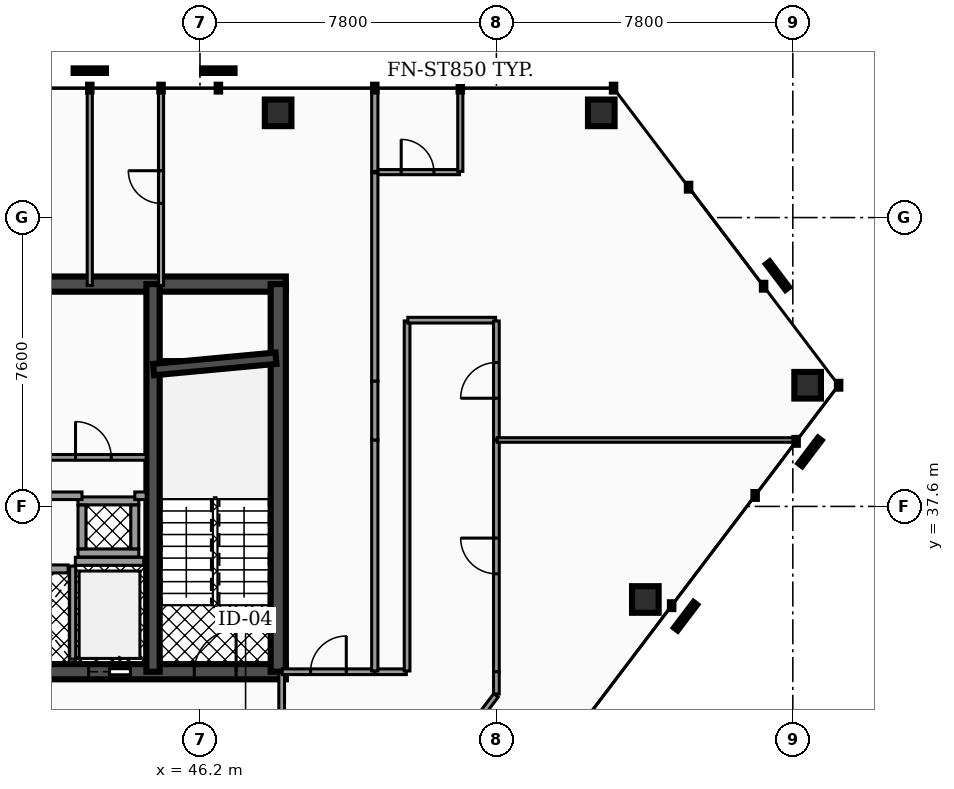
"""IFC4 building model, lengths in metres.
Left out: names, types, materials, properties, quantities, classifications, styles, units other than length and angle.
Written with IfcOpenShell. Run it as: python <this file> out.ifc"""

import sys

from ifc_helpers import new_model, si_unit, direction, frame, frame_2d, origin, origin_2d, place, context, subcontext, project, spatial, rectangle, hollow_rectangle, extrude, element, fill, save


model = new_model("IFC4")
c1 = context("Model", 3, precision=1e-05, world=origin(), true_north=direction((0.0, 1.0)))
c2 = subcontext(c1, "Body", "Model", "MODEL_VIEW")
j1 = project(units=[si_unit("LENGTHUNIT", "METRE"), si_unit("PLANEANGLEUNIT", "RADIAN")], contexts=[c1])
p1 = place(None, origin())
s1 = spatial("IfcSite", under=j1, at=p1, CompositionType="ELEMENT")
p2 = place(p1, origin())
s2 = spatial("IfcBuilding", under=s1, at=p2, CompositionType="ELEMENT")
p3 = place(p2, frame((0.0, 0.0, 187.0)))
s3 = spatial("IfcBuildingStorey", under=s2, at=p3, CompositionType="ELEMENT", Elevation=187.0)
p4 = place(p3, frame((28.4, 43.45, 0.0), z_axis=(0.0, 0.0, 1.0), x_axis=(1.0, 0.0, 0.0)))
e1 = element("IfcWall", 1, at=p4, inside=s3, PredefinedType="SHEAR", context=c2, shape_type="SweptSolid", body=[
    extrude(rectangle(XDim=20.06, YDim=0.4, at=frame_2d((10.03, 0.0))), origin(), (0.0, 0.0, 1.0), 3.5),
])
p5 = place(p3, frame((28.4, 33.25, 0.0), z_axis=(0.0, 0.0, 1.0), x_axis=(1.0, 0.0, 0.0)))
e2 = element("IfcWall", 2, at=p5, inside=s3, PredefinedType="SHEAR", context=c2, shape_type="SweptSolid", body=[
    extrude(rectangle(XDim=20.06, YDim=0.4, at=frame_2d((10.03, 0.0))), origin(), (0.0, 0.0, 1.0), 3.5),
])
p6 = place(p5, frame((4.03, 0.0, 0.0)))
e3 = element("IfcOpeningElement", 3, at=p6, cuts=e2, PredefinedType="OPENING", context=c2, shape_type="SweptSolid", body=[
    extrude(rectangle(XDim=1.1, YDim=2.15, at=frame_2d((0.55, 1.075))), frame((0.0, 0.21, 0.0), z_axis=(0.0, -1.0, 0.0), x_axis=(1.0, 0.0, 0.0)), (0.0, 0.0, 1.0), 0.42),
])
p7 = place(p5, frame((14.87, 0.0, 0.0)))
e4 = element("IfcOpeningElement", 4, at=p7, cuts=e2, PredefinedType="OPENING", context=c2, shape_type="SweptSolid", body=[
    extrude(rectangle(XDim=1.1, YDim=2.15, at=frame_2d((0.55, 1.075))), frame((0.0, 0.21, 0.0), z_axis=(0.0, -1.0, 0.0), x_axis=(1.0, 0.0, 0.0)), (0.0, 0.0, 1.0), 0.42),
])
p8 = place(p5, frame((5.95, 0.0, 0.0)))
e5 = element("IfcOpeningElement", 5, at=p8, cuts=e2, PredefinedType="OPENING", context=c2, shape_type="SweptSolid", body=[
    extrude(rectangle(XDim=1.0, YDim=2.1, at=frame_2d((0.5, 1.05))), frame((0.0, 0.21, 0.0), z_axis=(0.0, -1.0, 0.0), x_axis=(1.0, 0.0, 0.0)), (0.0, 0.0, 1.0), 0.42),
])
p9 = place(p5, frame((7.65, 0.0, 0.0)))
e6 = element("IfcOpeningElement", 6, at=p9, cuts=e2, PredefinedType="OPENING", context=c2, shape_type="SweptSolid", body=[
    extrude(rectangle(XDim=1.0, YDim=2.1, at=frame_2d((0.5, 1.05))), frame((0.0, 0.21, 0.0), z_axis=(0.0, -1.0, 0.0), x_axis=(1.0, 0.0, 0.0)), (0.0, 0.0, 1.0), 0.42),
])
p10 = place(p5, frame((1.31, 0.0, 0.0)))
e7 = element("IfcOpeningElement", 7, at=p10, cuts=e2, PredefinedType="OPENING", context=c2, shape_type="SweptSolid", body=[
    extrude(rectangle(XDim=1.1, YDim=2.2, at=frame_2d((0.55, 1.1))), frame((0.0, 0.21, 0.0), z_axis=(0.0, -1.0, 0.0), x_axis=(1.0, 0.0, 0.0)), (0.0, 0.0, 1.0), 0.42),
])
p11 = place(p5, frame((9.44, 0.0, 0.0)))
e8 = element("IfcOpeningElement", 8, at=p11, cuts=e2, PredefinedType="OPENING", context=c2, shape_type="SweptSolid", body=[
    extrude(rectangle(XDim=1.12, YDim=2.05, at=frame_2d((0.56, 1.025))), frame((0.0, 0.21, 0.0), z_axis=(0.0, -1.0, 0.0), x_axis=(1.0, 0.0, 0.0)), (0.0, 0.0, 1.0), 0.42),
])
p12 = place(p5, frame((17.65, 0.0, 0.0)))
e9 = element("IfcOpeningElement", 9, at=p12, cuts=e2, PredefinedType="OPENING", context=c2, shape_type="SweptSolid", body=[
    extrude(rectangle(XDim=1.1, YDim=2.2, at=frame_2d((0.55, 1.1))), frame((0.0, 0.21, 0.0), z_axis=(0.0, -1.0, 0.0), x_axis=(1.0, 0.0, 0.0)), (0.0, 0.0, 1.0), 0.42),
])
p13 = place(p3, frame((44.965, 33.25, 0.0), z_axis=(0.0, 0.0, 1.0), x_axis=(0.0, 1.0, 0.0)))
e10 = element("IfcWall", 10, at=p13, inside=s3, PredefinedType="SHEAR", context=c2, shape_type="SweptSolid", body=[
    extrude(rectangle(XDim=10.2, YDim=0.35, at=frame_2d((5.1, 0.0))), origin(), (0.0, 0.0, 1.0), 3.5),
])
p14 = place(p3, frame((48.26, 33.25, 0.0), z_axis=(0.0, 0.0, 1.0), x_axis=(0.0, 1.0, 0.0)))
e11 = element("IfcWall", 11, at=p14, inside=s3, PredefinedType="SHEAR", context=c2, shape_type="SweptSolid", body=[
    extrude(rectangle(XDim=10.2, YDim=0.4, at=frame_2d((5.1, 0.0))), origin(), (0.0, 0.0, 1.0), 3.5),
])
p15 = place(p3, frame((44.98, 41.2, 0.0), z_axis=(0.0, 0.0, 1.0), x_axis=(0.995686468965, 0.09278176286, 0.0)))
e12 = element("IfcWall", 12, at=p15, inside=s3, PredefinedType="SHEAR", context=c2, shape_type="SweptSolid", body=[
    extrude(rectangle(XDim=3.234, YDim=0.3, at=frame_2d((1.617, 0.0))), origin(), (0.0, 0.0, 1.0), 3.5),
])
for number, where, z_axis, x_axis in (
    (13, (56.76, 47.956, 0.0), (0.0, 0.0, 1.0), (1.0, 0.0, 0.0)),
    (14, (48.256, 47.956, 0.0), (0.0, 0.0, 1.0), (1.0, 0.0, 0.0)),
    (15, (57.919, 35.151, 0.0), (0.0, 0.0, 1.0), (1.0, 0.0, 0.0)),
    (16, (62.19, 40.788, 0.0), (0.0, 0.0, 1.0), (1.0, 0.0, 0.0)),
):
    element("IfcColumn", number, at=place(p3, frame(where, z_axis=z_axis, x_axis=x_axis)), inside=s3, PredefinedType="COLUMN", context=c2, shape_type="SweptSolid", body=[
        extrude(hollow_rectangle(XDim=0.7, YDim=0.7, WallThickness=0.035, at=origin_2d()), origin(), (0.0, 0.0, 1.0), 3.5),
    ])
p16 = place(p3, frame((42.92, 36.155, 0.0), z_axis=(0.0, 0.0, 1.0), x_axis=(1.0, 0.0, 0.0)))
e17 = element("IfcWall", 17, at=p16, inside=s3, PredefinedType="SOLIDWALL", context=c2, shape_type="SweptSolid", body=[
    extrude(rectangle(XDim=1.8, YDim=0.21, at=frame_2d((0.9, 0.0))), origin(), (0.0, 0.0, 1.0), 2.472),
])
p17 = place(p3, frame((42.85, 33.58, 0.0), z_axis=(0.0, 0.0, 1.0), x_axis=(0.0, 1.0, 0.0)))
e18 = element("IfcWall", 18, at=p17, inside=s3, PredefinedType="SOLIDWALL", context=c2, shape_type="SweptSolid", body=[
    extrude(rectangle(XDim=2.45, YDim=0.16, at=frame_2d((1.225, 0.0))), origin(), (0.0, 0.0, 1.0), 2.472),
])
p18 = place(p3, frame((41.17, 35.955, 0.0), z_axis=(0.0, 0.0, 1.0), x_axis=(1.0, 0.0, 0.0)))
e19 = element("IfcWall", 19, at=p18, inside=s3, PredefinedType="SOLIDWALL", context=c2, shape_type="SweptSolid", body=[
    extrude(rectangle(XDim=1.56, YDim=0.21, at=frame_2d((0.78, 0.0))), origin(), (0.0, 0.0, 1.0), 2.472),
])
for number, where, z_axis, x_axis in (
    (20, (42.99, 36.375, 0.0), (0.0, 0.0, 1.0), (1.0, 0.0, 0.0)),
    (21, (42.99, 37.745, 0.0), (0.0, 0.0, 1.0), (1.0, 0.0, 0.0)),
):
    element("IfcWall", number, at=place(p3, frame(where, z_axis=z_axis, x_axis=x_axis)), inside=s3, PredefinedType="SOLIDWALL", context=c2, shape_type="SweptSolid", body=[
        extrude(rectangle(XDim=1.6, YDim=0.21, at=frame_2d((0.8, 0.0))), origin(), (0.0, 0.0, 1.0), 3.5),
    ])
for number, where, z_axis, x_axis in (
    (22, (43.095, 36.485, 0.0), (0.0, 0.0, 1.0), (0.0, 1.0, 0.0)),
    (23, (44.485, 36.485, 0.0), (0.0, 0.0, 1.0), (0.0, 1.0, 0.0)),
):
    element("IfcWall", number, at=place(p3, frame(where, z_axis=z_axis, x_axis=x_axis)), inside=s3, PredefinedType="SOLIDWALL", context=c2, shape_type="SweptSolid", body=[
        extrude(rectangle(XDim=1.15, YDim=0.21, at=frame_2d((0.575, 0.0))), origin(), (0.0, 0.0, 1.0), 3.5),
    ])
p19 = place(p3, frame((42.005, 38.89, 0.0), z_axis=(0.0, 0.0, 1.0), x_axis=(1.0, 0.0, 0.0)))
e24 = element("IfcWall", 24, at=p19, inside=s3, PredefinedType="PARTITIONING", context=c2, shape_type="SweptSolid", body=[
    extrude(rectangle(XDim=2.78, YDim=0.15, at=frame_2d((1.39, 0.0))), origin(), (0.0, 0.0, 1.0), 2.457),
])
p20 = place(p19, frame((0.92, 0.0, 0.0)))
e25 = element("IfcOpeningElement", 25, at=p20, cuts=e24, PredefinedType="OPENING", context=c2, shape_type="SweptSolid", body=[
    extrude(rectangle(XDim=0.94, YDim=2.05, at=frame_2d((0.47, 1.025))), frame((0.0, 0.085, 0.0), z_axis=(0.0, -1.0, 0.0), x_axis=(1.0, 0.0, 0.0)), (0.0, 0.0, 1.0), 0.17),
])
p21 = place(p3, frame((39.27, 37.88, 0.0), z_axis=(0.0, 0.0, 1.0), x_axis=(1.0, 0.0, 0.0)))
e26 = element("IfcWall", 26, at=p21, inside=s3, PredefinedType="PARTITIONING", context=c2, shape_type="SweptSolid", body=[
    extrude(rectangle(XDim=3.825, YDim=0.2, at=frame_2d((1.913, 0.0))), origin(), (0.0, 0.0, 1.0), 2.457),
])
p22 = place(p3, frame((44.485, 37.88, 0.0), z_axis=(0.0, 0.0, 1.0), x_axis=(1.0, 0.0, 0.0)))
e27 = element("IfcWall", 27, at=p22, inside=s3, PredefinedType="PARTITIONING", context=c2, shape_type="SweptSolid", body=[
    extrude(rectangle(XDim=0.3, YDim=0.2, at=frame_2d((0.15, 0.0))), origin(), (0.0, 0.0, 1.0), 2.457),
])
p23 = place(p3, frame((48.35, 30.17, 0.0), z_axis=(0.0, 0.0, 1.0), x_axis=(0.0, 1.0, 0.0)))
e28 = element("IfcWall", 28, at=p23, inside=s3, PredefinedType="PARTITIONING", context=c2, shape_type="SweptSolid", body=[
    extrude(rectangle(XDim=3.06, YDim=0.15, at=frame_2d((1.53, 0.0))), origin(), (0.0, 0.0, 1.0), 2.457),
])
p24 = place(p23, frame((1.06, 0.0, 0.0)))
e29 = element("IfcOpeningElement", 29, at=p24, cuts=e28, PredefinedType="OPENING", context=c2, shape_type="SweptSolid", body=[
    extrude(rectangle(XDim=0.94, YDim=2.05, at=frame_2d((0.47, 1.025))), frame((0.0, 0.085, 0.0), z_axis=(0.0, -1.0, 0.0), x_axis=(1.0, 0.0, 0.0)), (0.0, 0.0, 1.0), 0.17),
])
p25 = place(p3, frame((54.0, 33.25, 0.0), z_axis=(0.0, 0.0, 1.0), x_axis=(0.0, 1.0, 0.0)))
e30 = element("IfcWall", 30, at=p25, inside=s3, PredefinedType="PARTITIONING", context=c2, shape_type="SweptSolid", body=[
    extrude(rectangle(XDim=6.093, YDim=0.15, at=frame_2d((3.046, 0.0))), origin(), (0.0, 0.0, 1.0), 2.457),
])
p26 = place(p25, frame((2.576, 0.0, 0.0)))
e31 = element("IfcOpeningElement", 31, at=p26, cuts=e30, PredefinedType="OPENING", context=c2, shape_type="SweptSolid", body=[
    extrude(rectangle(XDim=0.94, YDim=2.05, at=frame_2d((0.47, 1.025))), frame((0.0, 0.085, 0.0), z_axis=(0.0, -1.0, 0.0), x_axis=(1.0, 0.0, 0.0)), (0.0, 0.0, 1.0), 0.17),
])
p27 = place(p3, frame((54.0, 32.664, 0.0), z_axis=(0.0, 0.0, 1.0), x_axis=(0.0, 1.0, 0.0)))
e32 = element("IfcWall", 32, at=p27, inside=s3, PredefinedType="PARTITIONING", context=c2, shape_type="SweptSolid", body=[
    extrude(rectangle(XDim=0.586, YDim=0.15, at=frame_2d((0.293, 0.0))), origin(), (0.0, 0.0, 1.0), 2.457),
])
p28 = place(p3, frame((52.114, 30.154, 0.0), z_axis=(0.0, 0.0, 1.0), x_axis=(0.603819819336, 0.797120835116, 0.0)))
e33 = element("IfcWall", 33, at=p28, inside=s3, PredefinedType="PARTITIONING", context=c2, shape_type="SweptSolid", body=[
    extrude(rectangle(XDim=3.103, YDim=0.15, at=frame_2d((1.552, 0.0))), origin(), (0.0, 0.0, 1.0), 2.457),
])
p29 = place(p3, frame((50.805, 33.25, 0.0), z_axis=(0.0, 0.0, 1.0), x_axis=(1.0, 0.0, 0.0)))
e34 = element("IfcWall", 34, at=p29, inside=s3, PredefinedType="PARTITIONING", context=c2, shape_type="SweptSolid", body=[
    extrude(rectangle(XDim=0.825, YDim=0.15, at=frame_2d((0.413, 0.0))), origin(), (0.0, 0.0, 1.0), 2.457),
])
p30 = place(p3, frame((51.65, 33.27, 0.0), z_axis=(0.0, 0.0, 1.0), x_axis=(0.0, 1.0, 0.0)))
e35 = element("IfcWall", 35, at=p30, inside=s3, PredefinedType="PARTITIONING", context=c2, shape_type="SweptSolid", body=[
    extrude(rectangle(XDim=9.21, YDim=0.15, at=frame_2d((4.605, 0.0))), origin(), (0.0, 0.0, 1.0), 2.457),
])
p31 = place(p3, frame((51.67, 42.5, 0.0), z_axis=(0.0, 0.0, 1.0), x_axis=(1.0, 0.0, 0.0)))
e36 = element("IfcWall", 36, at=p31, inside=s3, PredefinedType="PARTITIONING", context=c2, shape_type="SweptSolid", body=[
    extrude(rectangle(XDim=2.31, YDim=0.15, at=frame_2d((1.155, 0.0))), origin(), (0.0, 0.0, 1.0), 2.457),
])
p32 = place(p3, frame((54.0, 39.353, 0.0), z_axis=(0.0, 0.0, 1.0), x_axis=(0.0, 1.0, 0.0)))
e37 = element("IfcWall", 37, at=p32, inside=s3, PredefinedType="PARTITIONING", context=c2, shape_type="SweptSolid", body=[
    extrude(rectangle(XDim=3.127, YDim=0.15, at=frame_2d((1.563, 0.0))), origin(), (0.0, 0.0, 1.0), 2.457),
])
p33 = place(p32, frame((1.094, 0.0, 0.0)))
e38 = element("IfcOpeningElement", 38, at=p33, cuts=e37, PredefinedType="OPENING", context=c2, shape_type="SweptSolid", body=[
    extrude(rectangle(XDim=0.94, YDim=2.05, at=frame_2d((0.47, 1.025))), frame((0.0, 0.085, 0.0), z_axis=(0.0, -1.0, 0.0), x_axis=(1.0, 0.0, 0.0)), (0.0, 0.0, 1.0), 0.17),
])
p34 = place(p3, frame((48.365, 33.25, 0.0), z_axis=(0.0, 0.0, 1.0), x_axis=(1.0, 0.0, 0.0)))
e39 = element("IfcWall", 39, at=p34, inside=s3, PredefinedType="PARTITIONING", context=c2, shape_type="SweptSolid", body=[
    extrude(rectangle(XDim=2.43, YDim=0.15, at=frame_2d((1.215, 0.0))), origin(), (0.0, 0.0, 1.0), 2.457),
])
p35 = place(p34, frame((0.745, 0.0, 0.0)))
e40 = element("IfcOpeningElement", 40, at=p35, cuts=e39, PredefinedType="OPENING", context=c2, shape_type="SweptSolid", body=[
    extrude(rectangle(XDim=0.94, YDim=2.05, at=frame_2d((0.47, 1.025))), frame((0.0, 0.085, 0.0), z_axis=(0.0, -1.0, 0.0), x_axis=(1.0, 0.0, 0.0)), (0.0, 0.0, 1.0), 0.17),
])
p36 = place(p3, frame((43.3, 43.415, 0.0), z_axis=(0.0, 0.0, 1.0), x_axis=(0.0, 1.0, 0.0)))
e41 = element("IfcWall", 41, at=p36, inside=s3, PredefinedType="PARTITIONING", context=c2, shape_type="SweptSolid", body=[
    extrude(rectangle(XDim=5.176, YDim=0.135, at=frame_2d((2.588, 0.0))), origin(), (0.0, 0.0, 1.0), 2.457),
])
p37 = place(p3, frame((54.02, 39.348, 0.0), z_axis=(0.0, 0.0, 1.0), x_axis=(1.0, 0.0, 0.0)))
e42 = element("IfcWall", 42, at=p37, inside=s3, PredefinedType="PARTITIONING", context=c2, shape_type="SweptSolid", body=[
    extrude(rectangle(XDim=7.879, YDim=0.12, at=frame_2d((3.94, 0.0))), origin(), (0.0, 0.0, 1.0), 2.457),
])
p38 = place(p3, frame((50.82, 46.396, 0.0), z_axis=(0.0, 0.0, 1.0), x_axis=(1.0, 0.0, 0.0)))
e43 = element("IfcWall", 43, at=p38, inside=s3, PredefinedType="PARTITIONING", context=c2, shape_type="SweptSolid", body=[
    extrude(rectangle(XDim=2.21, YDim=0.135, at=frame_2d((1.105, 0.0))), origin(), (0.0, 0.0, 1.0), 2.457),
])
p39 = place(p38, frame((0.675, 0.0, 0.0)))
e44 = element("IfcOpeningElement", 44, at=p39, cuts=e43, PredefinedType="OPENING", context=c2, shape_type="SweptSolid", body=[
    extrude(rectangle(XDim=0.86, YDim=2.05, at=frame_2d((0.43, 1.025))), frame((0.0, 0.077, 0.0), z_axis=(0.0, -1.0, 0.0), x_axis=(1.0, 0.0, 0.0)), (0.0, 0.0, 1.0), 0.155),
])
p40 = place(p3, frame((53.05, 46.416, 0.0), z_axis=(0.0, 0.0, 1.0), x_axis=(0.0, 1.0, 0.0)))
e45 = element("IfcWall", 45, at=p40, inside=s3, PredefinedType="PARTITIONING", context=c2, shape_type="SweptSolid", body=[
    extrude(rectangle(XDim=2.175, YDim=0.135, at=frame_2d((1.087, 0.0))), origin(), (0.0, 0.0, 1.0), 2.457),
])
p41 = place(p3, frame((50.8, 33.27, 0.0), z_axis=(0.0, 0.0, 1.0), x_axis=(0.0, 1.0, 0.0)))
e46 = element("IfcWall", 46, at=p41, inside=s3, PredefinedType="PARTITIONING", context=c2, shape_type="SweptSolid", body=[
    extrude(rectangle(XDim=6.078, YDim=0.165, at=frame_2d((3.039, 0.0))), origin(), (0.0, 0.0, 1.0), 2.457),
])
p42 = place(p3, frame((50.8, 39.348, 0.0), z_axis=(0.0, 0.0, 1.0), x_axis=(0.0, 1.0, 0.0)))
e47 = element("IfcWall", 47, at=p42, inside=s3, PredefinedType="PARTITIONING", context=c2, shape_type="SweptSolid", body=[
    extrude(rectangle(XDim=1.55, YDim=0.165, at=frame_2d((0.775, 0.0))), origin(), (0.0, 0.0, 1.0), 2.457),
])
p43 = place(p3, frame((50.8, 40.898, 0.0), z_axis=(0.0, 0.0, 1.0), x_axis=(0.0, 1.0, 0.0)))
e48 = element("IfcWall", 48, at=p43, inside=s3, PredefinedType="PARTITIONING", context=c2, shape_type="SweptSolid", body=[
    extrude(rectangle(XDim=5.478, YDim=0.165, at=frame_2d((2.739, 0.0))), origin(), (0.0, 0.0, 1.0), 2.457),
])
p44 = place(p3, frame((50.8, 46.416, 0.0), z_axis=(0.0, 0.0, 1.0), x_axis=(0.0, 1.0, 0.0)))
e49 = element("IfcWall", 49, at=p44, inside=s3, PredefinedType="PARTITIONING", context=c2, shape_type="SweptSolid", body=[
    extrude(rectangle(XDim=2.175, YDim=0.165, at=frame_2d((1.087, 0.0))), origin(), (0.0, 0.0, 1.0), 2.457),
])
p45 = place(p3, frame((45.175, 43.415, 0.0), z_axis=(0.0, 0.0, 1.0), x_axis=(0.0, 1.0, 0.0)))
e50 = element("IfcWall", 50, at=p45, inside=s3, PredefinedType="PARTITIONING", context=c2, shape_type="SweptSolid", body=[
    extrude(rectangle(XDim=5.176, YDim=0.135, at=frame_2d((2.588, 0.0))), origin(), (0.0, 0.0, 1.0), 2.457),
])
p46 = place(p45, frame((2.158, 0.0, 0.0)))
e51 = element("IfcOpeningElement", 51, at=p46, cuts=e50, PredefinedType="OPENING", context=c2, shape_type="SweptSolid", body=[
    extrude(rectangle(XDim=0.86, YDim=2.05, at=frame_2d((0.43, 1.025))), frame((0.0, 0.077, 0.0), z_axis=(0.0, -1.0, 0.0), x_axis=(1.0, 0.0, 0.0)), (0.0, 0.0, 1.0), 0.155),
])
p47 = place(p7, origin())
e52 = element("IfcDoor", 52, at=p47, inside=s3, OperationType="SLIDING_TO_RIGHT", PredefinedType="DOOR", context=c2, shape_type="SweptSolid", body=[
    extrude(rectangle(XDim=1.1, YDim=2.15, at=frame_2d((0.55, 1.075))), frame((0.0, 0.025, 0.0), z_axis=(0.0, -1.0, 0.0), x_axis=(1.0, 0.0, 0.0)), (0.0, 0.0, 1.0), 0.05),
])
fill(e4, e52)
p48 = place(p12, origin())
e53 = element("IfcDoor", 53, at=p48, inside=s3, OperationType="SINGLE_SWING_RIGHT", PredefinedType="DOOR", context=c2, shape_type="SweptSolid", body=[
    extrude(rectangle(XDim=1.1, YDim=2.2, at=frame_2d((0.55, 1.1))), frame((0.0, 0.025, 0.0), z_axis=(0.0, -1.0, 0.0), x_axis=(1.0, 0.0, 0.0)), (0.0, 0.0, 1.0), 0.05),
])
fill(e9, e53)
p49 = place(p20, origin())
e54 = element("IfcDoor", 54, at=p49, inside=s3, OperationType="SINGLE_SWING_LEFT", PredefinedType="DOOR", context=c2, shape_type="SweptSolid", body=[
    extrude(rectangle(XDim=0.94, YDim=2.05, at=frame_2d((0.47, 1.025))), frame((0.0, 0.025, 0.0), z_axis=(0.0, -1.0, 0.0), x_axis=(1.0, 0.0, 0.0)), (0.0, 0.0, 1.0), 0.05),
])
fill(e25, e54)
p50 = place(p26, origin())
e55 = element("IfcDoor", 55, at=p50, inside=s3, OperationType="SINGLE_SWING_RIGHT", PredefinedType="DOOR", context=c2, shape_type="SweptSolid", body=[
    extrude(rectangle(XDim=0.94, YDim=2.05, at=frame_2d((0.47, 1.025))), frame((0.0, 0.025, 0.0), z_axis=(0.0, -1.0, 0.0), x_axis=(1.0, 0.0, 0.0)), (0.0, 0.0, 1.0), 0.05),
])
fill(e31, e55)
p51 = place(p33, origin())
e56 = element("IfcDoor", 56, at=p51, inside=s3, OperationType="SINGLE_SWING_LEFT", PredefinedType="DOOR", context=c2, shape_type="SweptSolid", body=[
    extrude(rectangle(XDim=0.94, YDim=2.05, at=frame_2d((0.47, 1.025))), frame((0.0, 0.025, 0.0), z_axis=(0.0, -1.0, 0.0), x_axis=(1.0, 0.0, 0.0)), (0.0, 0.0, 1.0), 0.05),
])
fill(e38, e56)
p52 = place(p35, origin())
e57 = element("IfcDoor", 57, at=p52, inside=s3, OperationType="SINGLE_SWING_RIGHT", PredefinedType="DOOR", context=c2, shape_type="SweptSolid", body=[
    extrude(rectangle(XDim=0.94, YDim=2.05, at=frame_2d((0.47, 1.025))), frame((0.0, 0.025, 0.0), z_axis=(0.0, -1.0, 0.0), x_axis=(1.0, 0.0, 0.0)), (0.0, 0.0, 1.0), 0.05),
])
fill(e40, e57)
p53 = place(p39, origin())
e58 = element("IfcDoor", 58, at=p53, inside=s3, OperationType="SINGLE_SWING_LEFT", PredefinedType="DOOR", context=c2, shape_type="SweptSolid", body=[
    extrude(rectangle(XDim=0.86, YDim=2.05, at=frame_2d((0.43, 1.025))), frame((0.0, 0.025, 0.0), z_axis=(0.0, -1.0, 0.0), x_axis=(1.0, 0.0, 0.0)), (0.0, 0.0, 1.0), 0.05),
])
fill(e44, e58)
p54 = place(p46, origin())
e59 = element("IfcDoor", 59, at=p54, inside=s3, OperationType="SINGLE_SWING_RIGHT", PredefinedType="DOOR", context=c2, shape_type="SweptSolid", body=[
    extrude(rectangle(XDim=0.86, YDim=2.05, at=frame_2d((0.43, 1.025))), frame((0.0, 0.025, 0.0), z_axis=(0.0, -1.0, 0.0), x_axis=(1.0, 0.0, 0.0)), (0.0, 0.0, 1.0), 0.05),
])
fill(e51, e59)
save(model, sys.argv[1])
